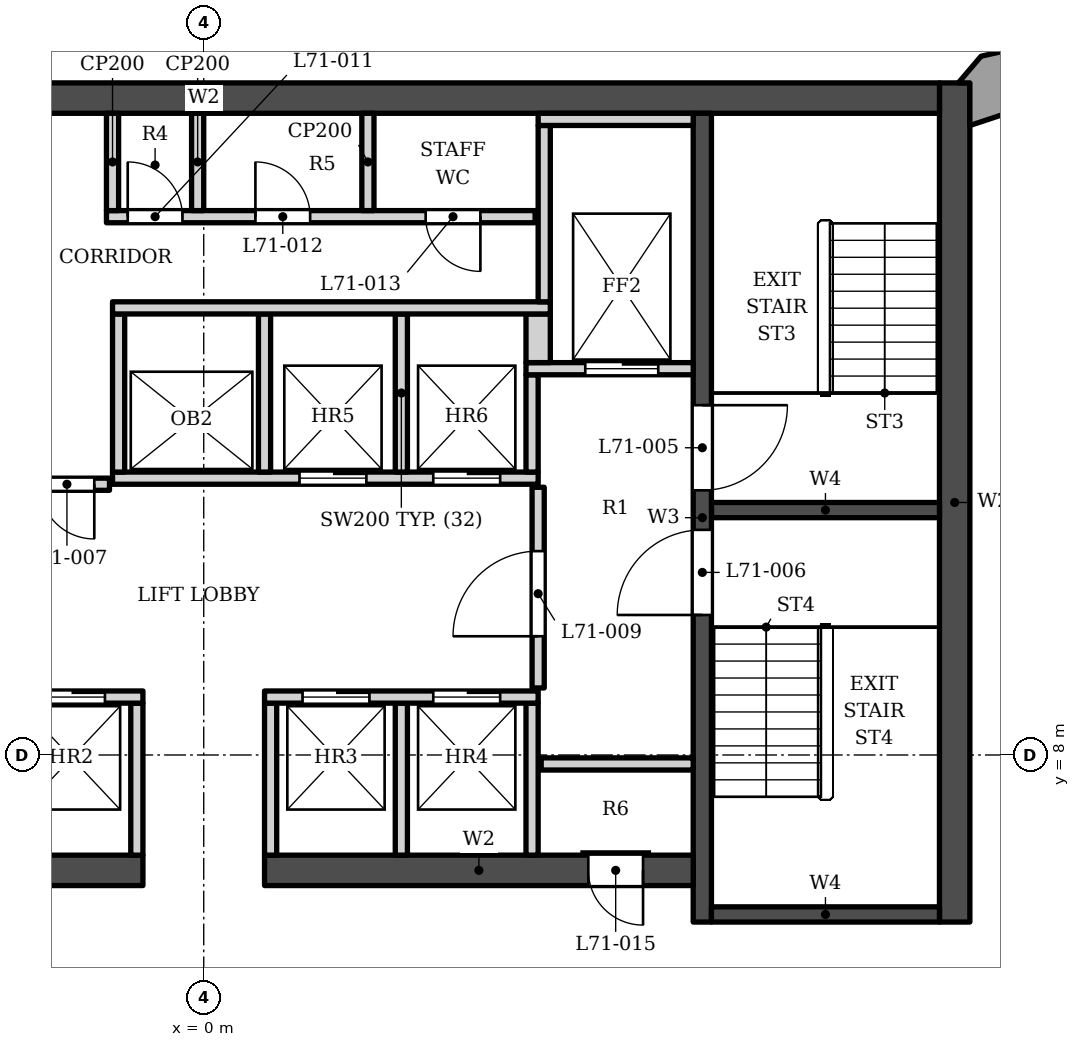
"""IFC4 building model, lengths in metres.
Left out: names, types, materials, properties, quantities, classifications, styles, units other than length and angle.
Written with IfcOpenShell. Run it as: python <this file> out.ifc"""

import sys

from ifc_helpers import new_model, si_unit, direction, frame, frame_2d, origin, place, context, subcontext, project, spatial, polyline, rectangle, outline, extrude, element, fill, save


model = new_model("IFC4")
c1 = context("Model", 3, precision=1e-05, world=origin(), true_north=direction((0.0, 1.0)))
c2 = subcontext(c1, "Body", "Model", "MODEL_VIEW")
j1 = project(units=[si_unit("LENGTHUNIT", "METRE"), si_unit("PLANEANGLEUNIT", "RADIAN")], contexts=[c1])
p1 = place(None, origin())
s1 = spatial("IfcSite", under=j1, at=p1, CompositionType="ELEMENT")
p2 = place(p1, origin())
s2 = spatial("IfcBuilding", under=s1, at=p2, CompositionType="ELEMENT")
p3 = place(p2, frame((0.0, 0.0, 295.0)))
s3 = spatial("IfcBuildingStorey", under=s2, at=p3, CompositionType="ELEMENT", Elevation=295.0)
p4 = place(p3, frame((-12.1, 18.802, 0.0), z_axis=(0.0, 0.0, 1.0), x_axis=(1.0, 0.0, 0.0)))
e1 = element("IfcWall", 1, at=p4, inside=s3, PredefinedType="SHEAR", context=c2, shape_type="SweptSolid", body=[
    extrude(rectangle(XDim=24.2, YDim=0.5, at=frame_2d((12.1, 0.0))), origin(), (0.0, 0.0, 1.0), 7.5),
])
p5 = place(p3, frame((12.35, 5.253, 0.0), z_axis=(0.0, 0.0, 1.0), x_axis=(0.0, 1.0, 0.0)))
e2 = element("IfcWall", 2, at=p5, inside=s3, PredefinedType="SHEAR", context=c2, shape_type="SweptSolid", body=[
    extrude(rectangle(XDim=13.8, YDim=0.5, at=frame_2d((6.9, 0.0))), origin(), (0.0, 0.0, 1.0), 7.5),
])
p6 = place(p3, frame((8.2, 5.253, 0.0), z_axis=(0.0, 0.0, 1.0), x_axis=(0.0, 1.0, 0.0)))
e3 = element("IfcWall", 3, at=p6, inside=s3, PredefinedType="SHEAR", context=c2, shape_type="SweptSolid", body=[
    extrude(rectangle(XDim=13.3, YDim=0.3, at=frame_2d((6.65, 0.0))), origin(), (0.0, 0.0, 1.0), 7.5),
])
p7 = place(p6, frame((7.1, 0.0, 0.0)))
e4 = element("IfcOpeningElement", 4, at=p7, cuts=e3, PredefinedType="OPENING", context=c2, shape_type="SweptSolid", body=[
    extrude(rectangle(XDim=1.4, YDim=2.1, at=frame_2d((0.7, 1.05))), frame((0.0, 0.16, 0.0), z_axis=(0.0, -1.0, 0.0), x_axis=(1.0, 0.0, 0.0)), (0.0, 0.0, 1.0), 0.32),
])
p8 = place(p6, frame((5.05, 0.0, 0.0)))
e5 = element("IfcOpeningElement", 5, at=p8, cuts=e3, PredefinedType="OPENING", context=c2, shape_type="SweptSolid", body=[
    extrude(rectangle(XDim=1.4, YDim=2.1, at=frame_2d((0.7, 1.05))), frame((0.0, 0.16, 0.0), z_axis=(0.0, -1.0, 0.0), x_axis=(1.0, 0.0, 0.0)), (0.0, 0.0, 1.0), 0.32),
])
for number, where, z_axis, x_axis in (
    (6, (8.35, 12.028, 0.0), (0.0, 0.0, 1.0), (1.0, 0.0, 0.0)),
    (7, (8.35, 5.378, 0.0), (0.0, 0.0, 1.0), (1.0, 0.0, 0.0)),
):
    element("IfcWall", number, at=place(p3, frame(where, z_axis=z_axis, x_axis=x_axis)), inside=s3, PredefinedType="SHEAR", context=c2, shape_type="SweptSolid", body=[
        extrude(rectangle(XDim=3.75, YDim=0.25, at=frame_2d((1.875, 0.0))), origin(), (0.0, 0.0, 1.0), 7.5),
    ])
p9 = place(p3, frame((-8.05, 6.103, 0.0), z_axis=(0.0, 0.0, 1.0), x_axis=(1.0, 0.0, 0.0)))
e8 = element("IfcWall", 8, at=p9, inside=s3, PredefinedType="SHEAR", context=c2, shape_type="SweptSolid", body=[
    extrude(rectangle(XDim=7.05, YDim=0.5, at=frame_2d((3.525, 0.0))), origin(), (0.0, 0.0, 1.0), 7.5),
])
p10 = place(p9, frame((0.825, 0.0, 0.0)))
e9 = element("IfcOpeningElement", 9, at=p10, cuts=e8, PredefinedType="OPENING", context=c2, shape_type="SweptSolid", body=[
    extrude(rectangle(XDim=0.9, YDim=2.1, at=frame_2d((0.45, 1.05))), frame((0.0, 0.26, 0.0), z_axis=(0.0, -1.0, 0.0), x_axis=(1.0, 0.0, 0.0)), (0.0, 0.0, 1.0), 0.52),
])
p11 = place(p3, frame((1.0, 6.103, 0.0), z_axis=(0.0, 0.0, 1.0), x_axis=(1.0, 0.0, 0.0)))
e10 = element("IfcWall", 10, at=p11, inside=s3, PredefinedType="SHEAR", context=c2, shape_type="SweptSolid", body=[
    extrude(rectangle(XDim=7.05, YDim=0.5, at=frame_2d((3.525, 0.0))), origin(), (0.0, 0.0, 1.0), 7.5),
])
p12 = place(p11, frame((5.325, 0.0, 0.0)))
e11 = element("IfcOpeningElement", 11, at=p12, cuts=e10, PredefinedType="OPENING", context=c2, shape_type="SweptSolid", body=[
    extrude(rectangle(XDim=0.9, YDim=2.1, at=frame_2d((0.45, 1.05))), frame((0.0, 0.26, 0.0), z_axis=(0.0, -1.0, 0.0), x_axis=(1.0, 0.0, 0.0)), (0.0, 0.0, 1.0), 0.52),
])
p13 = place(p3, origin())
e12 = element("IfcWall", 12, at=p13, inside=s3, PredefinedType="SOLIDWALL", context=c2, shape_type="SweptSolid", body=[
    extrude(outline(polyline([(14.201, 18.883), (14.008, 19.762), (12.784, 19.492), (12.41, 19.052), (12.6, 19.052), (12.6, 18.352), (14.201, 18.883)])), origin(), (0.0, 0.0, 1.0), 6.5),
])
for number, where, z_axis, x_axis in (
    (13, (-1.1, 6.353, 0.0), (0.0, 0.0, 1.0), (0.0, 1.0, 0.0)),
    (14, (1.1, 6.353, 0.0), (0.0, 0.0, 1.0), (0.0, 1.0, 0.0)),
    (15, (3.25, 6.353, 0.0), (0.0, 0.0, 1.0), (0.0, 1.0, 0.0)),
    (16, (5.4, 6.353, 0.0), (0.0, 0.0, 1.0), (0.0, 1.0, 0.0)),
    (17, (5.55, 7.853, 0.0), (0.0, 0.0, 1.0), (1.0, 0.0, 0.0)),
):
    element("IfcWall", number, at=place(p3, frame(where, z_axis=z_axis, x_axis=x_axis)), inside=s3, PredefinedType="SOLIDWALL", context=c2, shape_type="SweptSolid", body=[
        extrude(rectangle(XDim=2.5, YDim=0.2, at=frame_2d((1.25, 0.0))), origin(), (0.0, 0.0, 1.0), 7.2),
    ])
p14 = place(p3, frame((-5.5, 8.953, 0.0), z_axis=(0.0, 0.0, 1.0), x_axis=(1.0, 0.0, 0.0)))
e18 = element("IfcWall", 18, at=p14, inside=s3, PredefinedType="SOLIDWALL", context=c2, shape_type="SweptSolid", body=[
    extrude(rectangle(XDim=4.5, YDim=0.2, at=frame_2d((2.25, 0.0))), origin(), (0.0, 0.0, 1.0), 7.2),
])
p15 = place(p14, frame((0.625, 0.0, 0.0)))
e19 = element("IfcOpeningElement", 19, at=p15, cuts=e18, PredefinedType="OPENING", context=c2, shape_type="SweptSolid", body=[
    extrude(rectangle(XDim=1.1, YDim=2.1, at=frame_2d((0.55, 1.05))), frame((0.0, 0.11, 0.0), z_axis=(0.0, -1.0, 0.0), x_axis=(1.0, 0.0, 0.0)), (0.0, 0.0, 1.0), 0.22),
])
p16 = place(p14, frame((2.775, 0.0, 0.0)))
e20 = element("IfcOpeningElement", 20, at=p16, cuts=e18, PredefinedType="OPENING", context=c2, shape_type="SweptSolid", body=[
    extrude(rectangle(XDim=1.1, YDim=2.1, at=frame_2d((0.55, 1.05))), frame((0.0, 0.11, 0.0), z_axis=(0.0, -1.0, 0.0), x_axis=(1.0, 0.0, 0.0)), (0.0, 0.0, 1.0), 0.22),
])
p17 = place(p3, frame((1.0, 8.953, 0.0), z_axis=(0.0, 0.0, 1.0), x_axis=(1.0, 0.0, 0.0)))
e21 = element("IfcWall", 21, at=p17, inside=s3, PredefinedType="SOLIDWALL", context=c2, shape_type="SweptSolid", body=[
    extrude(rectangle(XDim=4.5, YDim=0.2, at=frame_2d((2.25, 0.0))), origin(), (0.0, 0.0, 1.0), 7.2),
])
p18 = place(p17, frame((0.625, 0.0, 0.0)))
e22 = element("IfcOpeningElement", 22, at=p18, cuts=e21, PredefinedType="OPENING", context=c2, shape_type="SweptSolid", body=[
    extrude(rectangle(XDim=1.1, YDim=2.1, at=frame_2d((0.55, 1.05))), frame((0.0, 0.11, 0.0), z_axis=(0.0, -1.0, 0.0), x_axis=(1.0, 0.0, 0.0)), (0.0, 0.0, 1.0), 0.22),
])
p19 = place(p17, frame((2.775, 0.0, 0.0)))
e23 = element("IfcOpeningElement", 23, at=p19, cuts=e21, PredefinedType="OPENING", context=c2, shape_type="SweptSolid", body=[
    extrude(rectangle(XDim=1.1, YDim=2.1, at=frame_2d((0.55, 1.05))), frame((0.0, 0.11, 0.0), z_axis=(0.0, -1.0, 0.0), x_axis=(1.0, 0.0, 0.0)), (0.0, 0.0, 1.0), 0.22),
])
p20 = place(p3, frame((5.5, 9.103, 0.0), z_axis=(0.0, 0.0, 1.0), x_axis=(0.0, 1.0, 0.0)))
e24 = element("IfcWall", 24, at=p20, inside=s3, PredefinedType="SOLIDWALL", context=c2, shape_type="SweptSolid", body=[
    extrude(rectangle(XDim=3.3, YDim=0.2, at=frame_2d((1.65, 0.0))), origin(), (0.0, 0.0, 1.0), 7.2),
])
p21 = place(p20, frame((0.85, 0.0, 0.0)))
e25 = element("IfcOpeningElement", 25, at=p21, cuts=e24, PredefinedType="OPENING", context=c2, shape_type="SweptSolid", body=[
    extrude(rectangle(XDim=1.4, YDim=2.1, at=frame_2d((0.7, 1.05))), frame((0.0, 0.11, 0.0), z_axis=(0.0, -1.0, 0.0), x_axis=(1.0, 0.0, 0.0)), (0.0, 0.0, 1.0), 0.22),
])
p22 = place(p3, frame((-2.95, 12.453, 0.0), z_axis=(0.0, 0.0, 1.0), x_axis=(1.0, 0.0, 0.0)))
e26 = element("IfcWall", 26, at=p22, inside=s3, PredefinedType="SOLIDWALL", context=c2, shape_type="SweptSolid", body=[
    extrude(rectangle(XDim=1.4, YDim=0.2, at=frame_2d((0.7, 0.0))), origin(), (0.0, 0.0, 1.0), 7.2),
])
p23 = place(p22, frame((0.25, 0.0, 0.0)))
e27 = element("IfcOpeningElement", 27, at=p23, cuts=e26, PredefinedType="OPENING", context=c2, shape_type="SweptSolid", body=[
    extrude(rectangle(XDim=0.9, YDim=2.1, at=frame_2d((0.45, 1.05))), frame((0.0, 0.11, 0.0), z_axis=(0.0, -1.0, 0.0), x_axis=(1.0, 0.0, 0.0)), (0.0, 0.0, 1.0), 0.22),
])
p24 = place(p3, frame((-1.5, 12.552, 0.0), z_axis=(0.0, 0.0, 1.0), x_axis=(1.0, 0.0, 0.0)))
e28 = element("IfcWall", 28, at=p24, inside=s3, PredefinedType="SOLIDWALL", context=c2, shape_type="SweptSolid", body=[
    extrude(rectangle(XDim=7.0, YDim=0.2, at=frame_2d((3.5, 0.0))), origin(), (0.0, 0.0, 1.0), 7.2),
])
p25 = place(p24, frame((3.075, 0.0, 0.0)))
e29 = element("IfcOpeningElement", 29, at=p25, cuts=e28, PredefinedType="OPENING", context=c2, shape_type="SweptSolid", body=[
    extrude(rectangle(XDim=1.1, YDim=2.1, at=frame_2d((0.55, 1.05))), frame((0.0, 0.11, 0.0), z_axis=(0.0, -1.0, 0.0), x_axis=(1.0, 0.0, 0.0)), (0.0, 0.0, 1.0), 0.22),
])
p26 = place(p24, frame((5.275, 0.0, 0.0)))
e30 = element("IfcOpeningElement", 30, at=p26, cuts=e28, PredefinedType="OPENING", context=c2, shape_type="SweptSolid", body=[
    extrude(rectangle(XDim=1.1, YDim=2.1, at=frame_2d((0.55, 1.05))), frame((0.0, 0.11, 0.0), z_axis=(0.0, -1.0, 0.0), x_axis=(1.0, 0.0, 0.0)), (0.0, 0.0, 1.0), 0.22),
])
for number, where, z_axis, x_axis in (
    (31, (-1.4, 12.653, 0.0), (0.0, 0.0, 1.0), (0.0, 1.0, 0.0)),
    (32, (1.0, 12.653, 0.0), (0.0, 0.0, 1.0), (0.0, 1.0, 0.0)),
    (33, (3.25, 12.653, 0.0), (0.0, 0.0, 1.0), (0.0, 1.0, 0.0)),
):
    element("IfcWall", number, at=place(p3, frame(where, z_axis=z_axis, x_axis=x_axis)), inside=s3, PredefinedType="SOLIDWALL", context=c2, shape_type="SweptSolid", body=[
        extrude(rectangle(XDim=2.6, YDim=0.2, at=frame_2d((1.3, 0.0))), origin(), (0.0, 0.0, 1.0), 7.2),
    ])
p27 = place(p3, frame((5.4, 12.653, 0.0), z_axis=(0.0, 0.0, 1.0), x_axis=(0.0, 1.0, 0.0)))
e34 = element("IfcWall", 34, at=p27, inside=s3, PredefinedType="SOLIDWALL", context=c2, shape_type="SweptSolid", body=[
    extrude(rectangle(XDim=1.6, YDim=0.2, at=frame_2d((0.8, 0.0))), origin(), (0.0, 0.0, 1.0), 7.2),
])
p28 = place(p3, frame((5.3, 14.353, 0.0), z_axis=(0.0, 0.0, 1.0), x_axis=(1.0, 0.0, 0.0)))
e35 = element("IfcWall", 35, at=p28, inside=s3, PredefinedType="SOLIDWALL", context=c2, shape_type="SweptSolid", body=[
    extrude(rectangle(XDim=2.75, YDim=0.2, at=frame_2d((1.375, 0.0))), origin(), (0.0, 0.0, 1.0), 7.2),
])
p29 = place(p28, frame((0.975, 0.0, 0.0)))
e36 = element("IfcOpeningElement", 36, at=p29, cuts=e35, PredefinedType="OPENING", context=c2, shape_type="SweptSolid", body=[
    extrude(rectangle(XDim=1.2, YDim=2.1, at=frame_2d((0.6, 1.05))), frame((0.0, 0.11, 0.0), z_axis=(0.0, -1.0, 0.0), x_axis=(1.0, 0.0, 0.0)), (0.0, 0.0, 1.0), 0.22),
])
p30 = place(p3, frame((5.5, 14.453, 0.0), z_axis=(0.0, 0.0, 1.0), x_axis=(0.0, 1.0, 0.0)))
e37 = element("IfcWall", 37, at=p30, inside=s3, PredefinedType="SOLIDWALL", context=c2, shape_type="SweptSolid", body=[
    extrude(rectangle(XDim=0.8, YDim=0.4, at=frame_2d((0.4, 0.0))), origin(), (0.0, 0.0, 1.0), 7.2),
])
p31 = place(p3, frame((-1.5, 15.353, 0.0), z_axis=(0.0, 0.0, 1.0), x_axis=(1.0, 0.0, 0.0)))
e38 = element("IfcWall", 38, at=p31, inside=s3, PredefinedType="SOLIDWALL", context=c2, shape_type="SweptSolid", body=[
    extrude(rectangle(XDim=7.2, YDim=0.2, at=frame_2d((3.6, 0.0))), origin(), (0.0, 0.0, 1.0), 7.2),
])
p32 = place(p3, frame((5.6, 15.453, 0.0), z_axis=(0.0, 0.0, 1.0), x_axis=(0.0, 1.0, 0.0)))
e39 = element("IfcWall", 39, at=p32, inside=s3, PredefinedType="SOLIDWALL", context=c2, shape_type="SweptSolid", body=[
    extrude(rectangle(XDim=2.9, YDim=0.2, at=frame_2d((1.45, 0.0))), origin(), (0.0, 0.0, 1.0), 7.2),
])
p33 = place(p3, frame((-1.6, 16.853, 0.0), z_axis=(0.0, 0.0, 1.0), x_axis=(1.0, 0.0, 0.0)))
e40 = element("IfcWall", 40, at=p33, inside=s3, PredefinedType="SOLIDWALL", context=c2, shape_type="SweptSolid", body=[
    extrude(rectangle(XDim=7.05, YDim=0.2, at=frame_2d((3.525, 0.0))), origin(), (0.0, 0.0, 1.0), 7.2),
])
p34 = place(p33, frame((0.35, 0.0, 0.0)))
e41 = element("IfcOpeningElement", 41, at=p34, cuts=e40, PredefinedType="OPENING", context=c2, shape_type="SweptSolid", body=[
    extrude(rectangle(XDim=0.9, YDim=2.1, at=frame_2d((0.45, 1.05))), frame((0.0, 0.11, 0.0), z_axis=(0.0, -1.0, 0.0), x_axis=(1.0, 0.0, 0.0)), (0.0, 0.0, 1.0), 0.22),
])
p35 = place(p33, frame((2.45, 0.0, 0.0)))
e42 = element("IfcOpeningElement", 42, at=p35, cuts=e40, PredefinedType="OPENING", context=c2, shape_type="SweptSolid", body=[
    extrude(rectangle(XDim=0.9, YDim=2.1, at=frame_2d((0.45, 1.05))), frame((0.0, 0.11, 0.0), z_axis=(0.0, -1.0, 0.0), x_axis=(1.0, 0.0, 0.0)), (0.0, 0.0, 1.0), 0.22),
])
p36 = place(p33, frame((5.25, 0.0, 0.0)))
e43 = element("IfcOpeningElement", 43, at=p36, cuts=e40, PredefinedType="OPENING", context=c2, shape_type="SweptSolid", body=[
    extrude(rectangle(XDim=0.9, YDim=2.1, at=frame_2d((0.45, 1.05))), frame((0.0, 0.11, 0.0), z_axis=(0.0, -1.0, 0.0), x_axis=(1.0, 0.0, 0.0)), (0.0, 0.0, 1.0), 0.22),
])
for number, where, z_axis, x_axis in (
    (44, (-1.5, 16.953, 0.0), (0.0, 0.0, 1.0), (0.0, 1.0, 0.0)),
    (45, (-0.1, 16.953, 0.0), (0.0, 0.0, 1.0), (0.0, 1.0, 0.0)),
    (46, (2.7, 16.953, 0.0), (0.0, 0.0, 1.0), (0.0, 1.0, 0.0)),
):
    element("IfcWall", number, at=place(p3, frame(where, z_axis=z_axis, x_axis=x_axis)), inside=s3, PredefinedType="PARTITIONING", context=c2, shape_type="SweptSolid", body=[
        extrude(rectangle(XDim=1.6, YDim=0.2, at=frame_2d((0.8, 0.0))), origin(), (0.0, 0.0, 1.0), 7.2),
    ])
p37 = place(p3, frame((5.5, 18.453, 0.0), z_axis=(0.0, 0.0, 1.0), x_axis=(1.0, 0.0, 0.0)))
e47 = element("IfcWall", 47, at=p37, inside=s3, PredefinedType="SOLIDWALL", context=c2, shape_type="SweptSolid", body=[
    extrude(rectangle(XDim=2.55, YDim=0.2, at=frame_2d((1.275, 0.0))), origin(), (0.0, 0.0, 1.0), 7.2),
])
p38 = place(p16, origin())
e48 = element("IfcDoor", 48, at=p38, inside=s3, OperationType="DOUBLE_DOOR_SLIDING", PredefinedType="DOOR", context=c2, shape_type="SweptSolid", body=[
    extrude(rectangle(XDim=1.1, YDim=2.1, at=frame_2d((0.55, 1.05))), frame((0.0, 0.025, 0.0), z_axis=(0.0, -1.0, 0.0), x_axis=(1.0, 0.0, 0.0)), (0.0, 0.0, 1.0), 0.05),
])
fill(e20, e48)
p39 = place(p18, origin())
e49 = element("IfcDoor", 49, at=p39, inside=s3, OperationType="DOUBLE_DOOR_SLIDING", PredefinedType="DOOR", context=c2, shape_type="SweptSolid", body=[
    extrude(rectangle(XDim=1.1, YDim=2.1, at=frame_2d((0.55, 1.05))), frame((0.0, 0.025, 0.0), z_axis=(0.0, -1.0, 0.0), x_axis=(1.0, 0.0, 0.0)), (0.0, 0.0, 1.0), 0.05),
])
fill(e22, e49)
p40 = place(p19, origin())
e50 = element("IfcDoor", 50, at=p40, inside=s3, OperationType="DOUBLE_DOOR_SLIDING", PredefinedType="DOOR", context=c2, shape_type="SweptSolid", body=[
    extrude(rectangle(XDim=1.1, YDim=2.1, at=frame_2d((0.55, 1.05))), frame((0.0, 0.025, 0.0), z_axis=(0.0, -1.0, 0.0), x_axis=(1.0, 0.0, 0.0)), (0.0, 0.0, 1.0), 0.05),
])
fill(e23, e50)
p41 = place(p25, origin())
e51 = element("IfcDoor", 51, at=p41, inside=s3, OperationType="DOUBLE_DOOR_SLIDING", PredefinedType="DOOR", context=c2, shape_type="SweptSolid", body=[
    extrude(rectangle(XDim=1.1, YDim=2.1, at=frame_2d((0.55, 1.05))), frame((0.0, 0.025, 0.0), z_axis=(0.0, -1.0, 0.0), x_axis=(1.0, 0.0, 0.0)), (0.0, 0.0, 1.0), 0.05),
])
fill(e29, e51)
p42 = place(p26, origin())
e52 = element("IfcDoor", 52, at=p42, inside=s3, OperationType="DOUBLE_DOOR_SLIDING", PredefinedType="DOOR", context=c2, shape_type="SweptSolid", body=[
    extrude(rectangle(XDim=1.1, YDim=2.1, at=frame_2d((0.55, 1.05))), frame((0.0, 0.025, 0.0), z_axis=(0.0, -1.0, 0.0), x_axis=(1.0, 0.0, 0.0)), (0.0, 0.0, 1.0), 0.05),
])
fill(e30, e52)
p43 = place(p29, origin())
e53 = element("IfcDoor", 53, at=p43, inside=s3, OperationType="DOUBLE_DOOR_SLIDING", PredefinedType="DOOR", context=c2, shape_type="SweptSolid", body=[
    extrude(rectangle(XDim=1.2, YDim=2.1, at=frame_2d((0.6, 1.05))), frame((0.0, 0.025, 0.0), z_axis=(0.0, -1.0, 0.0), x_axis=(1.0, 0.0, 0.0)), (0.0, 0.0, 1.0), 0.05),
])
fill(e36, e53)
p44 = place(p7, origin())
e54 = element("IfcDoor", 54, at=p44, inside=s3, OperationType="SINGLE_SWING_RIGHT", PredefinedType="DOOR", context=c2, shape_type="SweptSolid", body=[
    extrude(rectangle(XDim=1.4, YDim=2.1, at=frame_2d((0.7, 1.05))), frame((0.0, 0.025, 0.0), z_axis=(0.0, -1.0, 0.0), x_axis=(1.0, 0.0, 0.0)), (0.0, 0.0, 1.0), 0.05),
])
fill(e4, e54)
p45 = place(p8, origin())
e55 = element("IfcDoor", 55, at=p45, inside=s3, OperationType="SINGLE_SWING_LEFT", PredefinedType="DOOR", context=c2, shape_type="SweptSolid", body=[
    extrude(rectangle(XDim=1.4, YDim=2.1, at=frame_2d((0.7, 1.05))), frame((0.0, 0.025, 0.0), z_axis=(0.0, -1.0, 0.0), x_axis=(1.0, 0.0, 0.0)), (0.0, 0.0, 1.0), 0.05),
])
fill(e5, e55)
p46 = place(p23, origin())
e56 = element("IfcDoor", 56, at=p46, inside=s3, OperationType="SINGLE_SWING_RIGHT", PredefinedType="DOOR", context=c2, shape_type="SweptSolid", body=[
    extrude(rectangle(XDim=0.9, YDim=2.1, at=frame_2d((0.45, 1.05))), frame((0.0, 0.025, 0.0), z_axis=(0.0, -1.0, 0.0), x_axis=(1.0, 0.0, 0.0)), (0.0, 0.0, 1.0), 0.05),
])
fill(e27, e56)
p47 = place(p21, origin())
e57 = element("IfcDoor", 57, at=p47, inside=s3, OperationType="SINGLE_SWING_LEFT", PredefinedType="DOOR", context=c2, shape_type="SweptSolid", body=[
    extrude(rectangle(XDim=1.4, YDim=2.1, at=frame_2d((0.7, 1.05))), frame((0.0, 0.025, 0.0), z_axis=(0.0, -1.0, 0.0), x_axis=(1.0, 0.0, 0.0)), (0.0, 0.0, 1.0), 0.05),
])
fill(e25, e57)
p48 = place(p34, origin())
e58 = element("IfcDoor", 58, at=p48, inside=s3, OperationType="SINGLE_SWING_LEFT", PredefinedType="DOOR", context=c2, shape_type="SweptSolid", body=[
    extrude(rectangle(XDim=0.9, YDim=2.1, at=frame_2d((0.45, 1.05))), frame((0.0, 0.025, 0.0), z_axis=(0.0, -1.0, 0.0), x_axis=(1.0, 0.0, 0.0)), (0.0, 0.0, 1.0), 0.05),
])
fill(e41, e58)
p49 = place(p35, origin())
e59 = element("IfcDoor", 59, at=p49, inside=s3, OperationType="SINGLE_SWING_LEFT", PredefinedType="DOOR", context=c2, shape_type="SweptSolid", body=[
    extrude(rectangle(XDim=0.9, YDim=2.1, at=frame_2d((0.45, 1.05))), frame((0.0, 0.025, 0.0), z_axis=(0.0, -1.0, 0.0), x_axis=(1.0, 0.0, 0.0)), (0.0, 0.0, 1.0), 0.05),
])
fill(e42, e59)
p50 = place(p36, origin())
e60 = element("IfcDoor", 60, at=p50, inside=s3, OperationType="SINGLE_SWING_RIGHT", PredefinedType="DOOR", context=c2, shape_type="SweptSolid", body=[
    extrude(rectangle(XDim=0.9, YDim=2.1, at=frame_2d((0.45, 1.05))), frame((0.0, 0.025, 0.0), z_axis=(0.0, -1.0, 0.0), x_axis=(1.0, 0.0, 0.0)), (0.0, 0.0, 1.0), 0.05),
])
fill(e43, e60)
p51 = place(p12, origin())
e61 = element("IfcDoor", 61, at=p51, inside=s3, OperationType="SINGLE_SWING_RIGHT", PredefinedType="DOOR", context=c2, shape_type="SweptSolid", body=[
    extrude(rectangle(XDim=0.9, YDim=2.1, at=frame_2d((0.45, 1.05))), frame((0.0, 0.025, 0.0), z_axis=(0.0, -1.0, 0.0), x_axis=(1.0, 0.0, 0.0)), (0.0, 0.0, 1.0), 0.05),
])
fill(e11, e61)
save(model, sys.argv[1])
